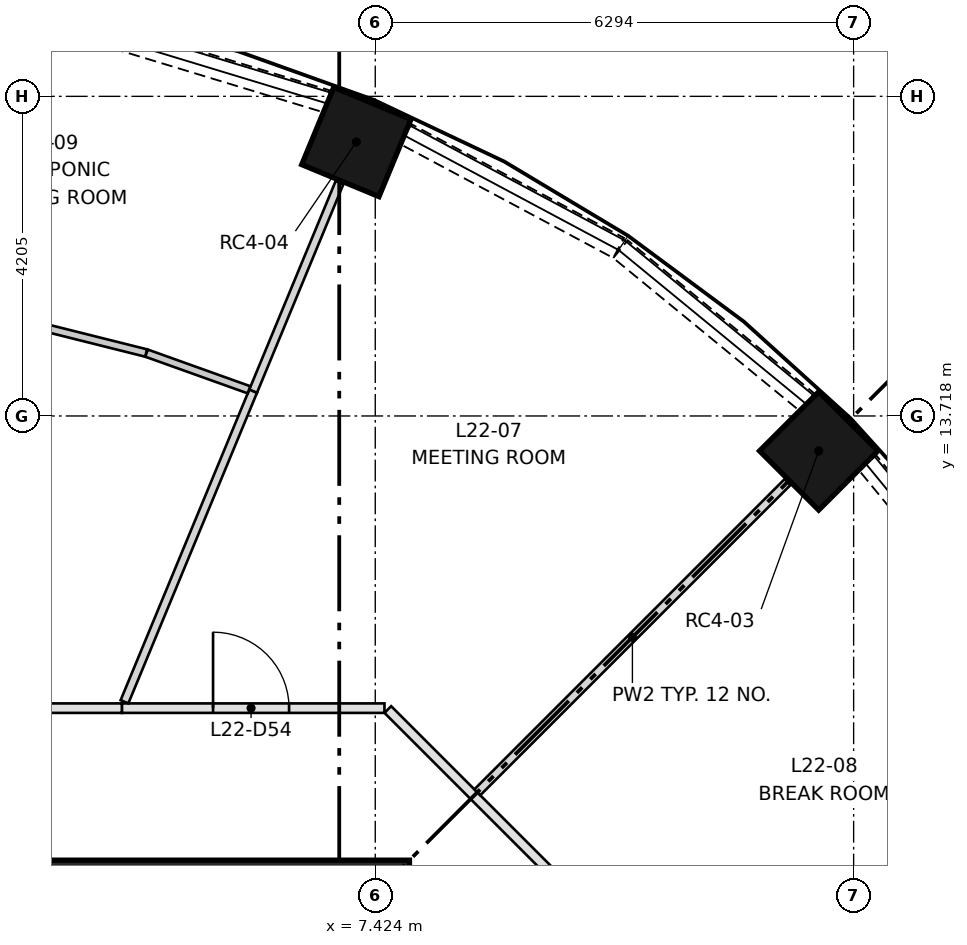
"""IFC4 building model, lengths in metres.
Left out: names, types, materials, properties, quantities, classifications, styles, units other than length and angle.
Written with IfcOpenShell. Run it as: python <this file> out.ifc"""

import sys

from ifc_helpers import new_model, si_unit, direction, frame, frame_2d, origin, origin_2d, place, context, subcontext, project, spatial, rectangle, extrude, element, fill, save


model = new_model("IFC4")
c1 = context("Model", 3, precision=1e-05, world=origin(), true_north=direction((0.0, 1.0)))
c2 = subcontext(c1, "Body", "Model", "MODEL_VIEW")
j1 = project(units=[si_unit("LENGTHUNIT", "METRE"), si_unit("PLANEANGLEUNIT", "RADIAN")], contexts=[c1])
p1 = place(None, origin())
s1 = spatial("IfcSite", under=j1, at=p1, CompositionType="ELEMENT")
p2 = place(p1, origin())
s2 = spatial("IfcBuilding", under=s1, at=p2, CompositionType="ELEMENT")
p3 = place(p2, frame((0.0, 0.0, 87.35)))
s3 = spatial("IfcBuildingStorey", under=s2, at=p3, CompositionType="ELEMENT", Elevation=87.35)
for number, where, z_axis, x_axis in (
    (1, (13.258, 13.258, 0.0), (0.0, 0.0, 1.0), (0.707, 0.707, 0.0)),
    (2, (7.175, 17.323, 0.0), (0.0, 0.0, 1.0), (0.383, 0.924, 0.0)),
):
    element("IfcColumn", number, at=place(p3, frame(where, z_axis=z_axis, x_axis=x_axis)), inside=s3, PredefinedType="COLUMN", context=c2, shape_type="SweptSolid", body=[
        extrude(rectangle(XDim=1.1, YDim=1.1, at=origin_2d()), origin(), (0.0, 0.0, 1.0), 3.65),
    ])
p4 = place(p3, frame((-7.874, 7.499, 0.0), z_axis=(0.0, 0.0, 1.0), x_axis=(1.0, 0.0, 0.0)))
e3 = element("IfcWall", 3, at=p4, inside=s3, PredefinedType="SHEAR", context=c2, shape_type="SweptSolid", body=[
    extrude(rectangle(XDim=15.748, YDim=0.75, at=frame_2d((7.874, 0.0))), origin(), (0.0, 0.0, 1.0), 3.65),
])
for number, where, z_axis, x_axis in (
    (4, (15.913, 10.651, 0.0), (0.0, 0.0, 1.0), (-0.634, 0.773, 0.0)),
    (5, (13.104, 13.9, 0.0), (0.0, 0.0, 1.0), (-0.773, 0.634, 0.0)),
):
    element("IfcWall", number, at=place(p3, frame(where, z_axis=z_axis, x_axis=x_axis)), inside=s3, PredefinedType="SOLIDWALL", context=c2, shape_type="SweptSolid", body=[
        extrude(rectangle(XDim=3.173, YDim=0.3, at=frame_2d((1.586, 0.0))), origin(), (0.0, 0.0, 1.0), 0.9),
    ])
p5 = place(p3, frame((10.626, 15.929, 0.0), z_axis=(0.0, 0.0, 1.0), x_axis=(-0.88188808669, 0.471458802606, 0.0)))
e6 = element("IfcWall", 6, at=p5, inside=s3, PredefinedType="SOLIDWALL", context=c2, shape_type="SweptSolid", body=[
    extrude(rectangle(XDim=3.172, YDim=0.3, at=frame_2d((1.586, 0.0))), origin(), (0.0, 0.0, 1.0), 0.9),
])
p6 = place(p3, frame((6.787, 17.856, 0.0), z_axis=(0.0, 0.0, 1.0), x_axis=(-0.956927923582, 0.290325591482, 0.0)))
e7 = element("IfcWall", 7, at=p6, inside=s3, PredefinedType="SOLIDWALL", context=c2, shape_type="SweptSolid", body=[
    extrude(rectangle(XDim=3.173, YDim=0.3, at=frame_2d((1.586, 0.0))), origin(), (0.0, 0.0, 1.0), 0.9),
])
p7 = place(p3, frame((8.722, 8.722, 0.0), z_axis=(0.0, 0.0, 1.0), x_axis=(0.70718294931, -0.707030604857, 0.0)))
e8 = element("IfcWall", 8, at=p7, inside=s3, PredefinedType="PARTITIONING", context=c2, shape_type="SweptSolid", body=[
    extrude(rectangle(XDim=1.603, YDim=0.125, at=frame_2d((0.801, 0.0))), origin(), (0.0, 0.0, 1.0), 3.3),
])
p8 = place(p3, frame((4.09, 9.874, 0.0), z_axis=(0.0, 0.0, 1.0), x_axis=(1.0, 0.0, 0.0)))
e9 = element("IfcWall", 9, at=p8, inside=s3, PredefinedType="PARTITIONING", context=c2, shape_type="SweptSolid", body=[
    extrude(rectangle(XDim=3.455, YDim=0.125, at=frame_2d((1.728, 0.0))), origin(), (0.0, 0.0, 1.0), 3.3),
])
p9 = place(p8, frame((1.2, 0.0, 0.0)))
e10 = element("IfcOpeningElement", 10, at=p9, cuts=e9, PredefinedType="OPENING", context=c2, shape_type="SweptSolid", body=[
    extrude(rectangle(XDim=1.0, YDim=2.1, at=frame_2d((0.5, 1.05))), frame((0.0, 0.073, 0.0), z_axis=(0.0, -1.0, 0.0), x_axis=(1.0, 0.0, 0.0)), (0.0, 0.0, 1.0), 0.145),
])
p10 = place(p3, frame((7.589, 9.856, 0.0), z_axis=(0.0, 0.0, 1.0), x_axis=(0.707030604857, -0.70718294931, 0.0)))
e11 = element("IfcWall", 11, at=p10, inside=s3, PredefinedType="PARTITIONING", context=c2, shape_type="SweptSolid", body=[
    extrude(rectangle(XDim=1.603, YDim=0.125, at=frame_2d((0.801, 0.0))), origin(), (0.0, 0.0, 1.0), 3.3),
])
p11 = place(p3, frame((-4.09, 9.874, 0.0), z_axis=(0.0, 0.0, 1.0), x_axis=(1.0, 0.0, 0.0)))
e12 = element("IfcWall", 12, at=p11, inside=s3, PredefinedType="PARTITIONING", context=c2, shape_type="SweptSolid", body=[
    extrude(rectangle(XDim=8.18, YDim=0.125, at=frame_2d((4.09, 0.0))), origin(), (0.0, 0.0, 1.0), 3.3),
])
p12 = place(p11, frame((3.6, 0.0, 0.0)))
e13 = element("IfcOpeningElement", 13, at=p12, cuts=e12, PredefinedType="OPENING", context=c2, shape_type="SweptSolid", body=[
    extrude(rectangle(XDim=1.0, YDim=2.1, at=frame_2d((0.5, 1.05))), frame((0.0, 0.073, 0.0), z_axis=(0.0, -1.0, 0.0), x_axis=(1.0, 0.0, 0.0)), (0.0, 0.0, 1.0), 0.145),
])
p13 = place(p3, frame((12.848, 12.848, 0.0), z_axis=(0.0, 0.0, 1.0), x_axis=(-0.707106781187, -0.707106781187, 0.0)))
e14 = element("IfcWall", 14, at=p13, inside=s3, PredefinedType="PARTITIONING", context=c2, shape_type="SweptSolid", body=[
    extrude(rectangle(XDim=5.772, YDim=0.11, at=frame_2d((2.886, 0.0))), origin(), (0.0, 0.0, 1.0), 3.3),
])
p14 = place(p3, frame((5.817, 14.043, 0.0), z_axis=(0.0, 0.0, 1.0), x_axis=(0.382659139036, 0.923889594764, 0.0)))
e15 = element("IfcWall", 15, at=p14, inside=s3, PredefinedType="PARTITIONING", context=c2, shape_type="SweptSolid", body=[
    extrude(rectangle(XDim=2.97, YDim=0.11, at=frame_2d((1.485, 0.0))), origin(), (0.0, 0.0, 1.0), 3.3),
])
p15 = place(p3, frame((4.125, 9.958, 0.0), z_axis=(0.0, 0.0, 1.0), x_axis=(0.382709362011, 0.923868791674, 0.0)))
e16 = element("IfcWall", 16, at=p15, inside=s3, PredefinedType="PARTITIONING", context=c2, shape_type="SweptSolid", body=[
    extrude(rectangle(XDim=4.422, YDim=0.11, at=frame_2d((2.211, 0.0))), origin(), (0.0, 0.0, 1.0), 3.3),
])
p16 = place(p3, frame((4.41, 14.546, 0.0), z_axis=(0.0, 0.0, 1.0), x_axis=(-0.970055497102, 0.242883372306, 0.0)))
e17 = element("IfcWall", 17, at=p16, inside=s3, PredefinedType="PARTITIONING", context=c2, shape_type="SweptSolid", body=[
    extrude(rectangle(XDim=1.487, YDim=0.1, at=frame_2d((0.743, 0.0))), origin(), (0.0, 0.0, 1.0), 3.3),
])
p17 = place(p3, frame((5.763, 14.062, 0.0), z_axis=(0.0, 0.0, 1.0), x_axis=(-0.941587499657, 0.33676843749, 0.0)))
e18 = element("IfcWall", 18, at=p17, inside=s3, PredefinedType="PARTITIONING", context=c2, shape_type="SweptSolid", body=[
    extrude(rectangle(XDim=1.432, YDim=0.1, at=frame_2d((0.716, 0.0))), origin(), (0.0, 0.0, 1.0), 3.3),
])
p18 = place(p9, origin())
e19 = element("IfcDoor", 19, at=p18, inside=s3, OperationType="SINGLE_SWING_LEFT", PredefinedType="DOOR", context=c2, shape_type="SweptSolid", body=[
    extrude(rectangle(XDim=1.0, YDim=2.1, at=frame_2d((0.5, 1.05))), frame((0.0, 0.025, 0.0), z_axis=(0.0, -1.0, 0.0), x_axis=(1.0, 0.0, 0.0)), (0.0, 0.0, 1.0), 0.05),
])
fill(e10, e19)
save(model, sys.argv[1])
